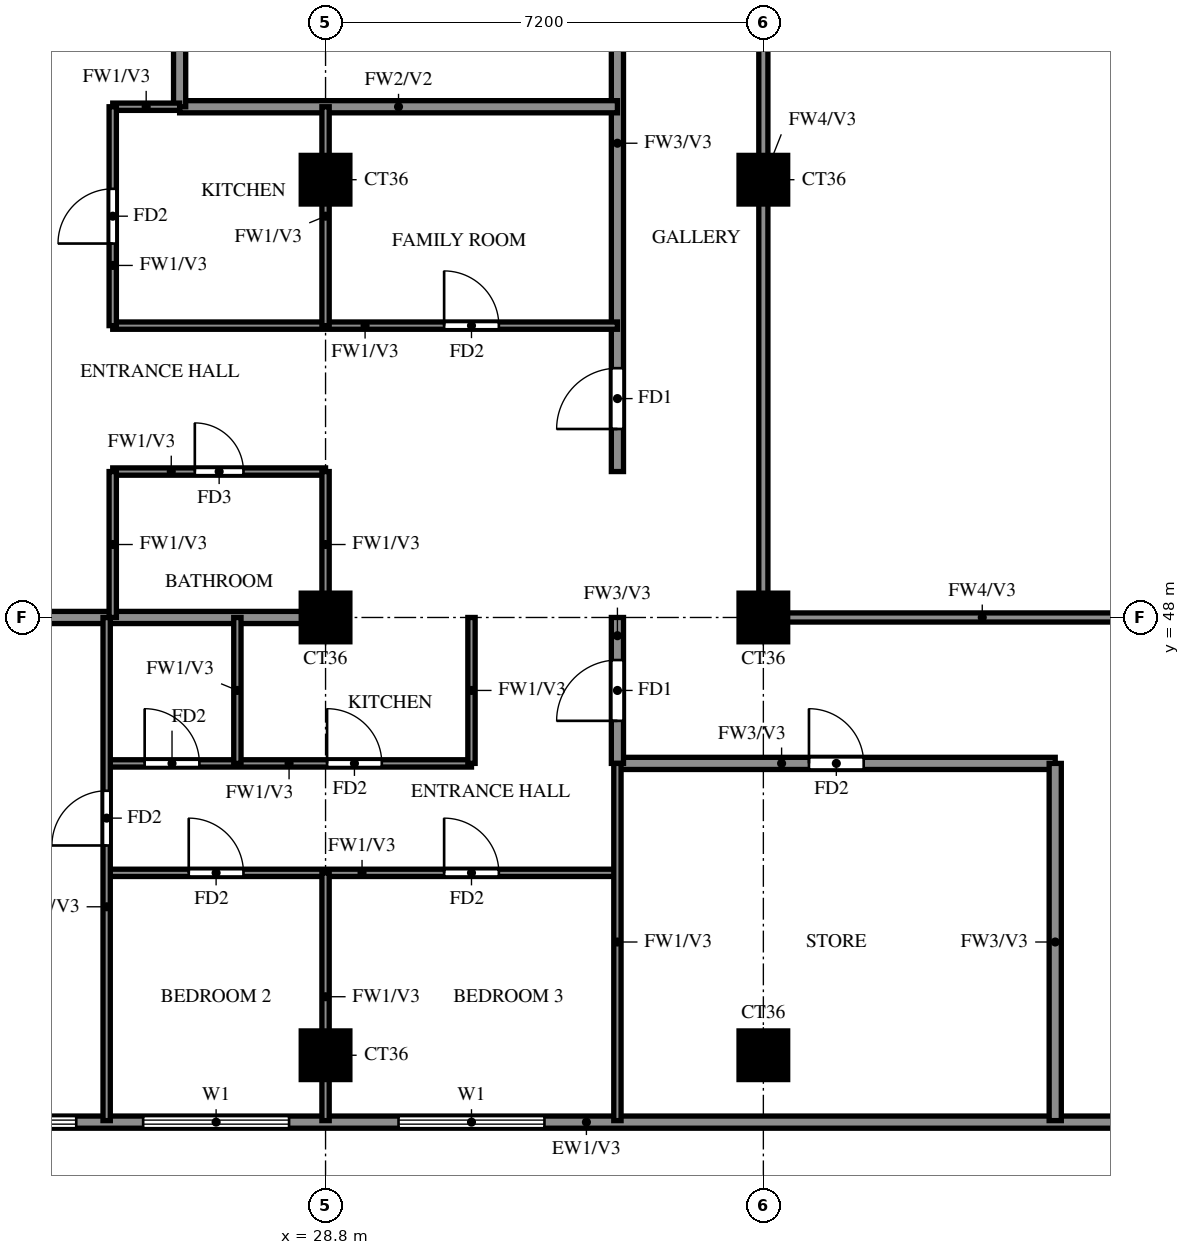
"""IFC4 building model, lengths in metres.
Left out: names, types, materials, properties, quantities, classifications, styles, units other than length and angle.
Written with IfcOpenShell. Run it as: python <this file> out.ifc"""

import sys

from ifc_helpers import new_model, si_unit, direction, frame, frame_2d, origin, origin_2d, place, context, subcontext, project, spatial, rectangle, extrude, source, transform, mapped, element, fill, save


model = new_model("IFC4")
c1 = context("Model", 3, precision=1e-05, world=origin(), true_north=direction((0.0, 1.0)))
c2 = subcontext(c1, "Body", "Model", "MODEL_VIEW")
j1 = project(units=[si_unit("LENGTHUNIT", "METRE"), si_unit("PLANEANGLEUNIT", "RADIAN")], contexts=[c1])
p1 = place(None, origin())
s1 = spatial("IfcSite", under=j1, at=p1, CompositionType="ELEMENT")
p2 = place(p1, origin())
s2 = spatial("IfcBuilding", under=s1, at=p2, CompositionType="ELEMENT")
p3 = place(p2, frame((0.0, 0.0, 232.5)))
s3 = spatial("IfcBuildingStorey", under=s2, at=p3, CompositionType="ELEMENT", Elevation=232.5)
m1 = source(origin(), c2, "Body", "SweptSolid", [
    extrude(rectangle(XDim=0.8, YDim=0.8, at=origin_2d()), origin(), (0.0, 0.0, 1.0), 3.22),
])
for number, where, z_axis, x_axis in (
    (1, (28.8, 40.8, 0.0), (0.0, 0.0, 1.0), (1.0, 0.0, 0.0)),
    (2, (36.0, 40.8, 0.0), (0.0, 0.0, 1.0), (1.0, 0.0, 0.0)),
    (3, (28.8, 48.0, 0.0), (0.0, 0.0, 1.0), (1.0, 0.0, 0.0)),
    (4, (36.0, 48.0, 0.0), (0.0, 0.0, 1.0), (1.0, 0.0, 0.0)),
    (5, (28.8, 55.2, 0.0), (0.0, 0.0, 1.0), (1.0, 0.0, 0.0)),
    (6, (36.0, 55.2, 0.0), (0.0, 0.0, 1.0), (1.0, 0.0, 0.0)),
):
    element("IfcColumn", number, at=place(p3, frame(where, z_axis=z_axis, x_axis=x_axis)), inside=s3, PredefinedType="COLUMN", context=c2, shape_type="MappedRepresentation", body=[
        mapped(m1, transform((0.0, 0.0, 0.0))),
    ])
p4 = place(p3, frame((22.2, 39.7, 0.0), z_axis=(0.0, 0.0, 1.0), x_axis=(1.0, 0.0, 0.0)))
e7 = element("IfcWall", 7, at=p4, inside=s3, PredefinedType="SOLIDWALL", context=c2, shape_type="SweptSolid", body=[
    extrude(rectangle(XDim=19.8, YDim=0.2, at=frame_2d((9.9, 0.0))), origin(), (0.0, 0.0, 1.0), 3.22),
])
p5 = place(p4, frame((0.7, 0.0, 0.6)))
e8 = element("IfcOpeningElement", 8, at=p5, cuts=e7, PredefinedType="OPENING", context=c2, shape_type="SweptSolid", body=[
    extrude(rectangle(XDim=1.8, YDim=2.4, at=frame_2d((0.9, 1.2))), frame((0.0, 0.11, 0.0), z_axis=(0.0, -1.0, 0.0), x_axis=(1.0, 0.0, 0.0)), (0.0, 0.0, 1.0), 0.22),
])
p6 = place(p4, frame((3.6, 0.0, 0.6)))
e9 = element("IfcOpeningElement", 9, at=p6, cuts=e7, PredefinedType="OPENING", context=c2, shape_type="SweptSolid", body=[
    extrude(rectangle(XDim=2.4, YDim=2.4, at=frame_2d((1.2, 1.2))), frame((0.0, 0.11, 0.0), z_axis=(0.0, -1.0, 0.0), x_axis=(1.0, 0.0, 0.0)), (0.0, 0.0, 1.0), 0.22),
])
p7 = place(p4, frame((7.8, 0.0, 0.6)))
e10 = element("IfcOpeningElement", 10, at=p7, cuts=e7, PredefinedType="OPENING", context=c2, shape_type="SweptSolid", body=[
    extrude(rectangle(XDim=2.4, YDim=2.4, at=frame_2d((1.2, 1.2))), frame((0.0, 0.11, 0.0), z_axis=(0.0, -1.0, 0.0), x_axis=(1.0, 0.0, 0.0)), (0.0, 0.0, 1.0), 0.22),
])
p8 = place(p3, frame((33.6, 45.6, 0.0), z_axis=(0.0, 0.0, 1.0), x_axis=(1.0, 0.0, 0.0)))
e11 = element("IfcWall", 11, at=p8, inside=s3, PredefinedType="SOLIDWALL", context=c2, shape_type="SweptSolid", body=[
    extrude(rectangle(XDim=7.2, YDim=0.2, at=frame_2d((3.6, 0.0))), origin(), (0.0, 0.0, 1.0), 3.22),
])
p9 = place(p8, frame((3.15, 0.0, 0.0)))
e12 = element("IfcOpeningElement", 12, at=p9, cuts=e11, PredefinedType="OPENING", context=c2, shape_type="SweptSolid", body=[
    extrude(rectangle(XDim=0.9, YDim=2.1, at=frame_2d((0.45, 1.05))), frame((0.0, 0.11, 0.0), z_axis=(0.0, -1.0, 0.0), x_axis=(1.0, 0.0, 0.0)), (0.0, 0.0, 1.0), 0.22),
])
p10 = place(p3, frame((33.6, 45.6, 0.0), z_axis=(0.0, 0.0, 1.0), x_axis=(0.0, 1.0, 0.0)))
e13 = element("IfcWall", 13, at=p10, inside=s3, PredefinedType="SOLIDWALL", context=c2, shape_type="SweptSolid", body=[
    extrude(rectangle(XDim=2.4, YDim=0.2, at=frame_2d((1.2, 0.0))), origin(), (0.0, 0.0, 1.0), 3.22),
])
p11 = place(p10, frame((0.7, 0.0, 0.0)))
e14 = element("IfcOpeningElement", 14, at=p11, cuts=e13, PredefinedType="OPENING", context=c2, shape_type="SweptSolid", body=[
    extrude(rectangle(XDim=1.0, YDim=2.1, at=frame_2d((0.5, 1.05))), frame((0.0, 0.11, 0.0), z_axis=(0.0, -1.0, 0.0), x_axis=(1.0, 0.0, 0.0)), (0.0, 0.0, 1.0), 0.22),
])
p12 = place(p3, frame((33.6, 50.4, 0.0), z_axis=(0.0, 0.0, 1.0), x_axis=(0.0, 1.0, 0.0)))
e15 = element("IfcWall", 15, at=p12, inside=s3, PredefinedType="SOLIDWALL", context=c2, shape_type="SweptSolid", body=[
    extrude(rectangle(XDim=12.0, YDim=0.2, at=frame_2d((6.0, 0.0))), origin(), (0.0, 0.0, 1.0), 3.22),
])
p13 = place(p12, frame((0.7, 0.0, 0.0)))
e16 = element("IfcOpeningElement", 16, at=p13, cuts=e15, PredefinedType="OPENING", context=c2, shape_type="SweptSolid", body=[
    extrude(rectangle(XDim=1.0, YDim=2.1, at=frame_2d((0.5, 1.05))), frame((0.0, 0.11, 0.0), z_axis=(0.0, -1.0, 0.0), x_axis=(1.0, 0.0, 0.0)), (0.0, 0.0, 1.0), 0.22),
])
p14 = place(p12, frame((9.7, 0.0, 0.0)))
e17 = element("IfcOpeningElement", 17, at=p14, cuts=e15, PredefinedType="OPENING", context=c2, shape_type="SweptSolid", body=[
    extrude(rectangle(XDim=1.0, YDim=2.1, at=frame_2d((0.5, 1.05))), frame((0.0, 0.11, 0.0), z_axis=(0.0, -1.0, 0.0), x_axis=(1.0, 0.0, 0.0)), (0.0, 0.0, 1.0), 0.22),
])
p15 = place(p3, frame((40.8, 39.725, 0.0), z_axis=(0.0, 0.0, 1.0), x_axis=(0.0, 1.0, 0.0)))
e18 = element("IfcWall", 18, at=p15, inside=s3, PredefinedType="SOLIDWALL", context=c2, shape_type="SweptSolid", body=[
    extrude(rectangle(XDim=5.875, YDim=0.2, at=frame_2d((2.938, 0.0))), origin(), (0.0, 0.0, 1.0), 3.22),
])
p16 = place(p3, frame((18.525, 48.0, 0.0), z_axis=(0.0, 0.0, 1.0), x_axis=(1.0, 0.0, 0.0)))
e19 = element("IfcWall", 19, at=p16, inside=s3, PredefinedType="SOLIDWALL", context=c2, shape_type="SweptSolid", body=[
    extrude(rectangle(XDim=10.275, YDim=0.2, at=frame_2d((5.138, 0.0))), origin(), (0.0, 0.0, 1.0), 3.22),
])
p17 = place(p3, frame((26.4, 56.4, 0.0), z_axis=(0.0, 0.0, 1.0), x_axis=(1.0, 0.0, 0.0)))
e20 = element("IfcWall", 20, at=p17, inside=s3, PredefinedType="SOLIDWALL", context=c2, shape_type="SweptSolid", body=[
    extrude(rectangle(XDim=7.2, YDim=0.2, at=frame_2d((3.6, 0.0))), origin(), (0.0, 0.0, 1.0), 3.22),
])
p18 = place(p3, frame((26.4, 56.4, 0.0), z_axis=(0.0, 0.0, 1.0), x_axis=(0.0, 1.0, 0.0)))
e21 = element("IfcWall", 21, at=p18, inside=s3, PredefinedType="SOLIDWALL", context=c2, shape_type="SweptSolid", body=[
    extrude(rectangle(XDim=2.4, YDim=0.2, at=frame_2d((1.2, 0.0))), origin(), (0.0, 0.0, 1.0), 3.22),
])
p19 = place(p3, frame((25.2, 43.8, 0.0), z_axis=(0.0, 0.0, 1.0), x_axis=(1.0, 0.0, 0.0)))
e22 = element("IfcWall", 22, at=p19, inside=s3, PredefinedType="PARTITIONING", context=c2, shape_type="SweptSolid", body=[
    extrude(rectangle(XDim=8.4, YDim=0.12, at=frame_2d((4.2, 0.0))), origin(), (0.0, 0.0, 1.0), 3.22),
])
p20 = place(p19, frame((1.35, 0.0, 0.0)))
e23 = element("IfcOpeningElement", 23, at=p20, cuts=e22, PredefinedType="OPENING", context=c2, shape_type="SweptSolid", body=[
    extrude(rectangle(XDim=0.9, YDim=2.1, at=frame_2d((0.45, 1.05))), frame((0.0, 0.07, 0.0), z_axis=(0.0, -1.0, 0.0), x_axis=(1.0, 0.0, 0.0)), (0.0, 0.0, 1.0), 0.14),
])
p21 = place(p19, frame((5.55, 0.0, 0.0)))
e24 = element("IfcOpeningElement", 24, at=p21, cuts=e22, PredefinedType="OPENING", context=c2, shape_type="SweptSolid", body=[
    extrude(rectangle(XDim=0.9, YDim=2.1, at=frame_2d((0.45, 1.05))), frame((0.0, 0.07, 0.0), z_axis=(0.0, -1.0, 0.0), x_axis=(1.0, 0.0, 0.0)), (0.0, 0.0, 1.0), 0.14),
])
p22 = place(p3, frame((25.2, 45.6, 0.0), z_axis=(0.0, 0.0, 1.0), x_axis=(1.0, 0.0, 0.0)))
e25 = element("IfcWall", 25, at=p22, inside=s3, PredefinedType="PARTITIONING", context=c2, shape_type="SweptSolid", body=[
    extrude(rectangle(XDim=6.0, YDim=0.12, at=frame_2d((3.0, 0.0))), origin(), (0.0, 0.0, 1.0), 3.22),
])
p23 = place(p22, frame((0.625, 0.0, 0.0)))
e26 = element("IfcOpeningElement", 26, at=p23, cuts=e25, PredefinedType="OPENING", context=c2, shape_type="SweptSolid", body=[
    extrude(rectangle(XDim=0.9, YDim=2.1, at=frame_2d((0.45, 1.05))), frame((0.0, 0.07, 0.0), z_axis=(0.0, -1.0, 0.0), x_axis=(1.0, 0.0, 0.0)), (0.0, 0.0, 1.0), 0.14),
])
p24 = place(p22, frame((3.625, 0.0, 0.0)))
e27 = element("IfcOpeningElement", 27, at=p24, cuts=e25, PredefinedType="OPENING", context=c2, shape_type="SweptSolid", body=[
    extrude(rectangle(XDim=0.9, YDim=2.1, at=frame_2d((0.45, 1.05))), frame((0.0, 0.07, 0.0), z_axis=(0.0, -1.0, 0.0), x_axis=(1.0, 0.0, 0.0)), (0.0, 0.0, 1.0), 0.14),
])
p25 = place(p3, frame((25.3, 50.4, 0.0), z_axis=(0.0, 0.0, 1.0), x_axis=(1.0, 0.0, 0.0)))
e28 = element("IfcWall", 28, at=p25, inside=s3, PredefinedType="PARTITIONING", context=c2, shape_type="SweptSolid", body=[
    extrude(rectangle(XDim=3.5, YDim=0.12, at=frame_2d((1.75, 0.0))), origin(), (0.0, 0.0, 1.0), 3.22),
])
p26 = place(p25, frame((1.35, 0.0, 0.0)))
e29 = element("IfcOpeningElement", 29, at=p26, cuts=e28, PredefinedType="OPENING", context=c2, shape_type="SweptSolid", body=[
    extrude(rectangle(XDim=0.8, YDim=2.1, at=frame_2d((0.4, 1.05))), frame((0.0, 0.07, 0.0), z_axis=(0.0, -1.0, 0.0), x_axis=(1.0, 0.0, 0.0)), (0.0, 0.0, 1.0), 0.14),
])
p27 = place(p3, frame((25.3, 52.8, 0.0), z_axis=(0.0, 0.0, 1.0), x_axis=(1.0, 0.0, 0.0)))
e30 = element("IfcWall", 30, at=p27, inside=s3, PredefinedType="PARTITIONING", context=c2, shape_type="SweptSolid", body=[
    extrude(rectangle(XDim=8.3, YDim=0.12, at=frame_2d((4.15, 0.0))), origin(), (0.0, 0.0, 1.0), 3.22),
])
p28 = place(p27, frame((5.45, 0.0, 0.0)))
e31 = element("IfcOpeningElement", 31, at=p28, cuts=e30, PredefinedType="OPENING", context=c2, shape_type="SweptSolid", body=[
    extrude(rectangle(XDim=0.9, YDim=2.1, at=frame_2d((0.45, 1.05))), frame((0.0, 0.07, 0.0), z_axis=(0.0, -1.0, 0.0), x_axis=(1.0, 0.0, 0.0)), (0.0, 0.0, 1.0), 0.14),
])
p29 = place(p3, frame((25.3, 56.4, 0.0), z_axis=(0.0, 0.0, 1.0), x_axis=(1.0, 0.0, 0.0)))
e32 = element("IfcWall", 32, at=p29, inside=s3, PredefinedType="PARTITIONING", context=c2, shape_type="SweptSolid", body=[
    extrude(rectangle(XDim=1.1, YDim=0.12, at=frame_2d((0.55, 0.0))), origin(), (0.0, 0.0, 1.0), 3.22),
])
p30 = place(p3, frame((25.2, 39.725, 0.0), z_axis=(0.0, 0.0, 1.0), x_axis=(0.0, 1.0, 0.0)))
e33 = element("IfcWall", 33, at=p30, inside=s3, PredefinedType="PARTITIONING", context=c2, shape_type="SweptSolid", body=[
    extrude(rectangle(XDim=8.275, YDim=0.12, at=frame_2d((4.137, 0.0))), origin(), (0.0, 0.0, 1.0), 3.22),
])
p31 = place(p30, frame((4.525, 0.0, 0.0)))
e34 = element("IfcOpeningElement", 34, at=p31, cuts=e33, PredefinedType="OPENING", context=c2, shape_type="SweptSolid", body=[
    extrude(rectangle(XDim=0.9, YDim=2.1, at=frame_2d((0.45, 1.05))), frame((0.0, 0.07, 0.0), z_axis=(0.0, -1.0, 0.0), x_axis=(1.0, 0.0, 0.0)), (0.0, 0.0, 1.0), 0.14),
])
p32 = place(p3, frame((25.3, 48.0, 0.0), z_axis=(0.0, 0.0, 1.0), x_axis=(0.0, 1.0, 0.0)))
e35 = element("IfcWall", 35, at=p32, inside=s3, PredefinedType="PARTITIONING", context=c2, shape_type="SweptSolid", body=[
    extrude(rectangle(XDim=2.4, YDim=0.12, at=frame_2d((1.2, 0.0))), origin(), (0.0, 0.0, 1.0), 3.22),
])
p33 = place(p3, frame((25.3, 52.8, 0.0), z_axis=(0.0, 0.0, 1.0), x_axis=(0.0, 1.0, 0.0)))
e36 = element("IfcWall", 36, at=p33, inside=s3, PredefinedType="PARTITIONING", context=c2, shape_type="SweptSolid", body=[
    extrude(rectangle(XDim=3.6, YDim=0.12, at=frame_2d((1.8, 0.0))), origin(), (0.0, 0.0, 1.0), 3.22),
])
p34 = place(p33, frame((1.35, 0.0, 0.0)))
e37 = element("IfcOpeningElement", 37, at=p34, cuts=e36, PredefinedType="OPENING", context=c2, shape_type="SweptSolid", body=[
    extrude(rectangle(XDim=0.9, YDim=2.1, at=frame_2d((0.45, 1.05))), frame((0.0, 0.07, 0.0), z_axis=(0.0, -1.0, 0.0), x_axis=(1.0, 0.0, 0.0)), (0.0, 0.0, 1.0), 0.14),
])
p35 = place(p3, frame((27.35, 45.6, 0.0), z_axis=(0.0, 0.0, 1.0), x_axis=(0.0, 1.0, 0.0)))
e38 = element("IfcWall", 38, at=p35, inside=s3, PredefinedType="PARTITIONING", context=c2, shape_type="SweptSolid", body=[
    extrude(rectangle(XDim=2.4, YDim=0.12, at=frame_2d((1.2, 0.0))), origin(), (0.0, 0.0, 1.0), 3.22),
])
p36 = place(p3, frame((28.8, 39.725, 0.0), z_axis=(0.0, 0.0, 1.0), x_axis=(0.0, 1.0, 0.0)))
e39 = element("IfcWall", 39, at=p36, inside=s3, PredefinedType="PARTITIONING", context=c2, shape_type="SweptSolid", body=[
    extrude(rectangle(XDim=4.075, YDim=0.12, at=frame_2d((2.038, 0.0))), origin(), (0.0, 0.0, 1.0), 3.22),
])
p37 = place(p3, frame((28.8, 48.0, 0.0), z_axis=(0.0, 0.0, 1.0), x_axis=(0.0, 1.0, 0.0)))
e40 = element("IfcWall", 40, at=p37, inside=s3, PredefinedType="PARTITIONING", context=c2, shape_type="SweptSolid", body=[
    extrude(rectangle(XDim=2.4, YDim=0.12, at=frame_2d((1.2, 0.0))), origin(), (0.0, 0.0, 1.0), 3.22),
])
p38 = place(p3, frame((28.8, 52.8, 0.0), z_axis=(0.0, 0.0, 1.0), x_axis=(0.0, 1.0, 0.0)))
e41 = element("IfcWall", 41, at=p38, inside=s3, PredefinedType="PARTITIONING", context=c2, shape_type="SweptSolid", body=[
    extrude(rectangle(XDim=3.6, YDim=0.12, at=frame_2d((1.8, 0.0))), origin(), (0.0, 0.0, 1.0), 3.22),
])
p39 = place(p3, frame((31.2, 45.6, 0.0), z_axis=(0.0, 0.0, 1.0), x_axis=(0.0, 1.0, 0.0)))
e42 = element("IfcWall", 42, at=p39, inside=s3, PredefinedType="PARTITIONING", context=c2, shape_type="SweptSolid", body=[
    extrude(rectangle(XDim=2.4, YDim=0.12, at=frame_2d((1.2, 0.0))), origin(), (0.0, 0.0, 1.0), 3.22),
])
p40 = place(p3, frame((33.6, 39.725, 0.0), z_axis=(0.0, 0.0, 1.0), x_axis=(0.0, 1.0, 0.0)))
e43 = element("IfcWall", 43, at=p40, inside=s3, PredefinedType="PARTITIONING", context=c2, shape_type="SweptSolid", body=[
    extrude(rectangle(XDim=5.875, YDim=0.12, at=frame_2d((2.938, 0.0))), origin(), (0.0, 0.0, 1.0), 3.22),
])
p41 = place(p3, frame((36.0, 48.0, 0.0), z_axis=(0.0, 0.0, 1.0), x_axis=(1.0, 0.0, 0.0)))
e44 = element("IfcWall", 44, at=p41, inside=s3, PredefinedType="SOLIDWALL", context=c2, shape_type="SweptSolid", body=[
    extrude(rectangle(XDim=7.2, YDim=0.15, at=frame_2d((3.6, 0.0))), origin(), (0.0, 0.0, 1.0), 2.32),
])
p42 = place(p3, frame((36.0, 48.0, 0.0), z_axis=(0.0, 0.0, 1.0), x_axis=(0.0, 1.0, 0.0)))
e45 = element("IfcWall", 45, at=p42, inside=s3, PredefinedType="SOLIDWALL", context=c2, shape_type="SweptSolid", body=[
    extrude(rectangle(XDim=14.4, YDim=0.15, at=frame_2d((7.2, 0.0))), origin(), (0.0, 0.0, 1.0), 2.32),
])
p43 = place(p5, origin())
e46 = element("IfcWindow", 46, at=p43, inside=s3, PartitioningType="DOUBLE_PANEL_VERTICAL", PredefinedType="WINDOW", context=c2, shape_type="SweptSolid", body=[
    extrude(rectangle(XDim=1.8, YDim=2.4, at=frame_2d((0.9, 1.2))), frame((0.0, 0.03, 0.0), z_axis=(0.0, -1.0, 0.0), x_axis=(1.0, 0.0, 0.0)), (0.0, 0.0, 1.0), 0.06),
])
fill(e8, e46)
p44 = place(p6, origin())
e47 = element("IfcWindow", 47, at=p44, inside=s3, PartitioningType="DOUBLE_PANEL_VERTICAL", PredefinedType="WINDOW", context=c2, shape_type="SweptSolid", body=[
    extrude(rectangle(XDim=2.4, YDim=2.4, at=frame_2d((1.2, 1.2))), frame((0.0, 0.03, 0.0), z_axis=(0.0, -1.0, 0.0), x_axis=(1.0, 0.0, 0.0)), (0.0, 0.0, 1.0), 0.06),
])
fill(e9, e47)
p45 = place(p7, origin())
e48 = element("IfcWindow", 48, at=p45, inside=s3, PartitioningType="DOUBLE_PANEL_VERTICAL", PredefinedType="WINDOW", context=c2, shape_type="SweptSolid", body=[
    extrude(rectangle(XDim=2.4, YDim=2.4, at=frame_2d((1.2, 1.2))), frame((0.0, 0.03, 0.0), z_axis=(0.0, -1.0, 0.0), x_axis=(1.0, 0.0, 0.0)), (0.0, 0.0, 1.0), 0.06),
])
fill(e10, e48)
p46 = place(p11, origin())
e49 = element("IfcDoor", 49, at=p46, inside=s3, OperationType="SINGLE_SWING_LEFT", PredefinedType="DOOR", context=c2, shape_type="SweptSolid", body=[
    extrude(rectangle(XDim=1.0, YDim=2.1, at=frame_2d((0.5, 1.05))), frame((0.0, 0.025, 0.0), z_axis=(0.0, -1.0, 0.0), x_axis=(1.0, 0.0, 0.0)), (0.0, 0.0, 1.0), 0.05),
])
fill(e14, e49)
p47 = place(p31, origin())
e50 = element("IfcDoor", 50, at=p47, inside=s3, OperationType="SINGLE_SWING_RIGHT", PredefinedType="DOOR", context=c2, shape_type="SweptSolid", body=[
    extrude(rectangle(XDim=0.9, YDim=2.1, at=frame_2d((0.45, 1.05))), frame((0.0, 0.025, 0.0), z_axis=(0.0, -1.0, 0.0), x_axis=(1.0, 0.0, 0.0)), (0.0, 0.0, 1.0), 0.05),
])
fill(e34, e50)
p48 = place(p20, origin())
e51 = element("IfcDoor", 51, at=p48, inside=s3, OperationType="SINGLE_SWING_LEFT", PredefinedType="DOOR", context=c2, shape_type="SweptSolid", body=[
    extrude(rectangle(XDim=0.9, YDim=2.1, at=frame_2d((0.45, 1.05))), frame((0.0, 0.025, 0.0), z_axis=(0.0, -1.0, 0.0), x_axis=(1.0, 0.0, 0.0)), (0.0, 0.0, 1.0), 0.05),
])
fill(e23, e51)
p49 = place(p21, origin())
e52 = element("IfcDoor", 52, at=p49, inside=s3, OperationType="SINGLE_SWING_LEFT", PredefinedType="DOOR", context=c2, shape_type="SweptSolid", body=[
    extrude(rectangle(XDim=0.9, YDim=2.1, at=frame_2d((0.45, 1.05))), frame((0.0, 0.025, 0.0), z_axis=(0.0, -1.0, 0.0), x_axis=(1.0, 0.0, 0.0)), (0.0, 0.0, 1.0), 0.05),
])
fill(e24, e52)
p50 = place(p23, origin())
e53 = element("IfcDoor", 53, at=p50, inside=s3, OperationType="SINGLE_SWING_RIGHT", PredefinedType="DOOR", context=c2, shape_type="SweptSolid", body=[
    extrude(rectangle(XDim=0.9, YDim=2.1, at=frame_2d((0.45, 1.05))), frame((0.0, 0.025, 0.0), z_axis=(0.0, -1.0, 0.0), x_axis=(1.0, 0.0, 0.0)), (0.0, 0.0, 1.0), 0.05),
])
fill(e26, e53)
p51 = place(p24, origin())
e54 = element("IfcDoor", 54, at=p51, inside=s3, OperationType="SINGLE_SWING_LEFT", PredefinedType="DOOR", context=c2, shape_type="SweptSolid", body=[
    extrude(rectangle(XDim=0.9, YDim=2.1, at=frame_2d((0.45, 1.05))), frame((0.0, 0.025, 0.0), z_axis=(0.0, -1.0, 0.0), x_axis=(1.0, 0.0, 0.0)), (0.0, 0.0, 1.0), 0.05),
])
fill(e27, e54)
p52 = place(p9, origin())
e55 = element("IfcDoor", 55, at=p52, inside=s3, OperationType="SINGLE_SWING_LEFT", PredefinedType="DOOR", context=c2, shape_type="SweptSolid", body=[
    extrude(rectangle(XDim=0.9, YDim=2.1, at=frame_2d((0.45, 1.05))), frame((0.0, 0.025, 0.0), z_axis=(0.0, -1.0, 0.0), x_axis=(1.0, 0.0, 0.0)), (0.0, 0.0, 1.0), 0.05),
])
fill(e12, e55)
p53 = place(p13, origin())
e56 = element("IfcDoor", 56, at=p53, inside=s3, OperationType="SINGLE_SWING_RIGHT", PredefinedType="DOOR", context=c2, shape_type="SweptSolid", body=[
    extrude(rectangle(XDim=1.0, YDim=2.1, at=frame_2d((0.5, 1.05))), frame((0.0, 0.025, 0.0), z_axis=(0.0, -1.0, 0.0), x_axis=(1.0, 0.0, 0.0)), (0.0, 0.0, 1.0), 0.05),
])
fill(e16, e56)
p54 = place(p26, origin())
e57 = element("IfcDoor", 57, at=p54, inside=s3, OperationType="SINGLE_SWING_RIGHT", PredefinedType="DOOR", context=c2, shape_type="SweptSolid", body=[
    extrude(rectangle(XDim=0.8, YDim=2.1, at=frame_2d((0.4, 1.05))), frame((0.0, 0.025, 0.0), z_axis=(0.0, -1.0, 0.0), x_axis=(1.0, 0.0, 0.0)), (0.0, 0.0, 1.0), 0.05),
])
fill(e29, e57)
p55 = place(p34, origin())
e58 = element("IfcDoor", 58, at=p55, inside=s3, OperationType="SINGLE_SWING_LEFT", PredefinedType="DOOR", context=c2, shape_type="SweptSolid", body=[
    extrude(rectangle(XDim=0.9, YDim=2.1, at=frame_2d((0.45, 1.05))), frame((0.0, 0.025, 0.0), z_axis=(0.0, -1.0, 0.0), x_axis=(1.0, 0.0, 0.0)), (0.0, 0.0, 1.0), 0.05),
])
fill(e37, e58)
p56 = place(p28, origin())
e59 = element("IfcDoor", 59, at=p56, inside=s3, OperationType="SINGLE_SWING_LEFT", PredefinedType="DOOR", context=c2, shape_type="SweptSolid", body=[
    extrude(rectangle(XDim=0.9, YDim=2.1, at=frame_2d((0.45, 1.05))), frame((0.0, 0.025, 0.0), z_axis=(0.0, -1.0, 0.0), x_axis=(1.0, 0.0, 0.0)), (0.0, 0.0, 1.0), 0.05),
])
fill(e31, e59)
save(model, sys.argv[1])
